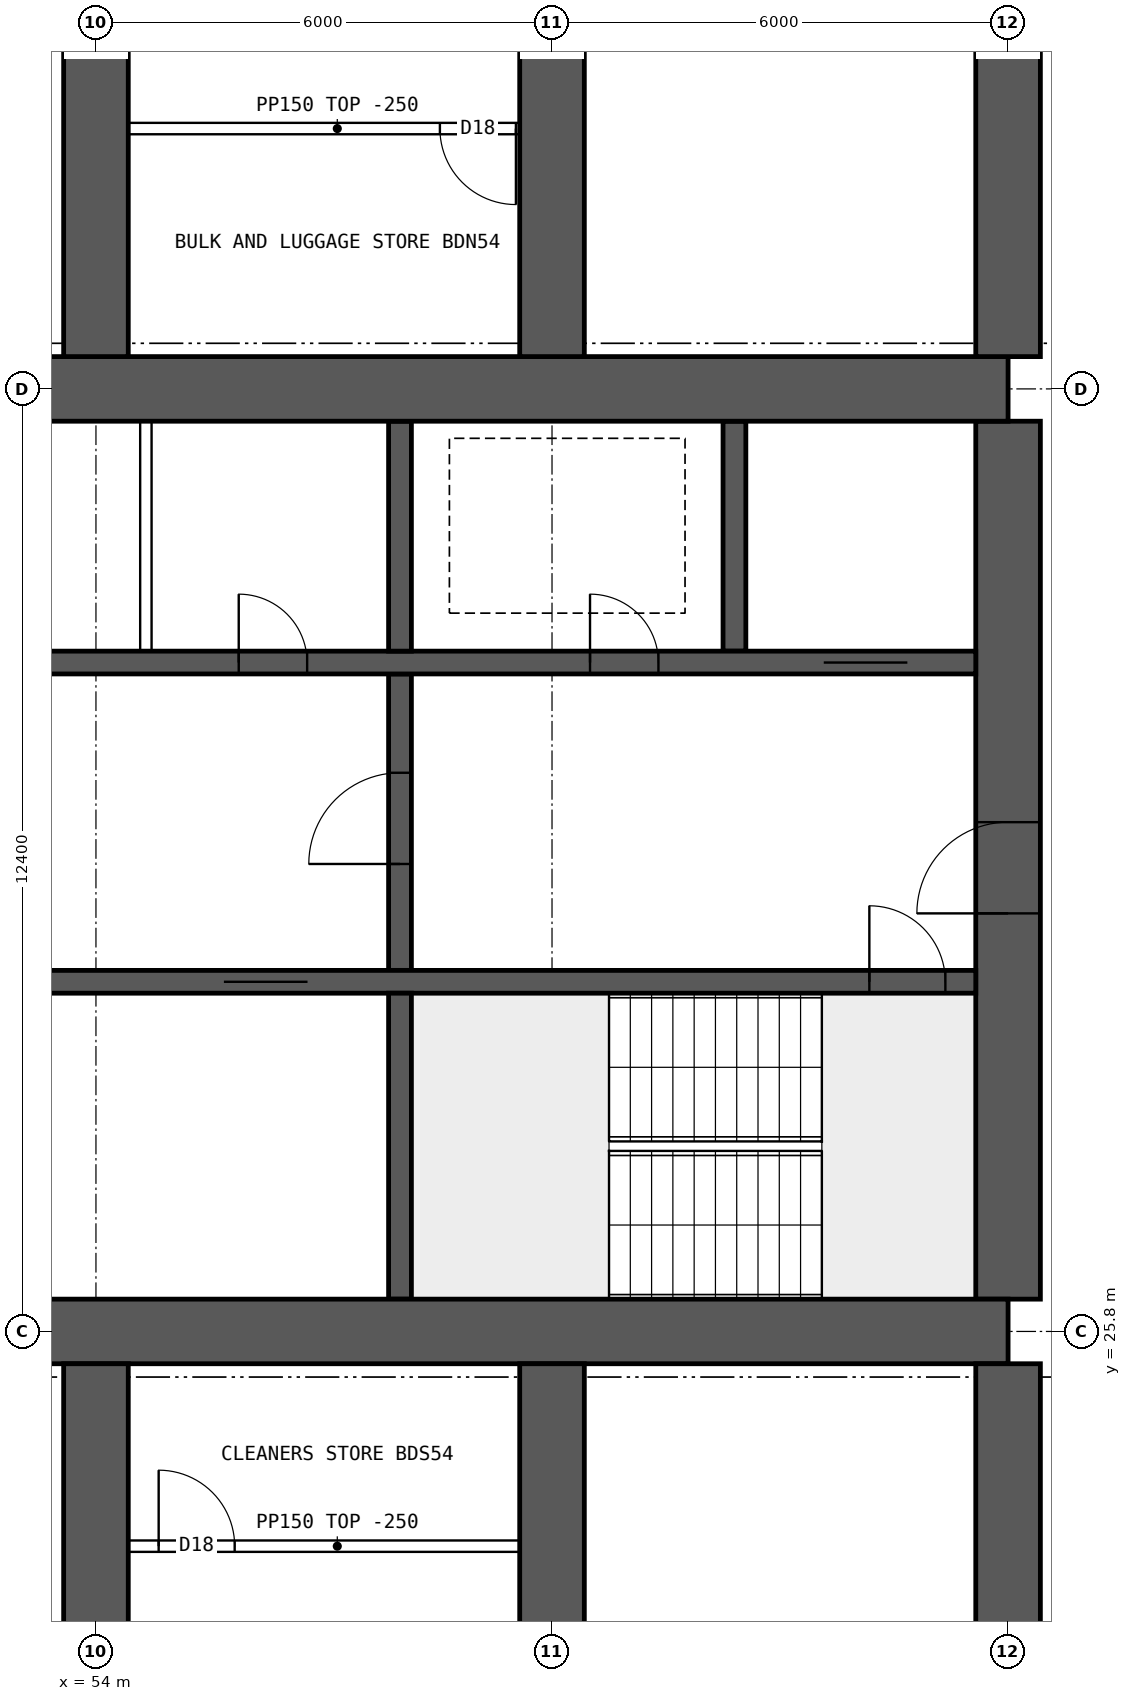
"""IFC4 building model, lengths in metres.
Left out: names, types, materials, properties, quantities, classifications, styles, units other than length and angle.
Written with IfcOpenShell. Run it as: python <this file> out.ifc"""

import sys

from ifc_helpers import new_model, si_unit, direction, frame, frame_2d, origin, place, context, subcontext, project, spatial, rectangle, extrude, element, fill, save


model = new_model("IFC4")
c1 = context("Model", 3, precision=1e-05, world=origin(), true_north=direction((0.0, 1.0)))
c2 = subcontext(c1, "Body", "Model", "MODEL_VIEW")
j1 = project(units=[si_unit("LENGTHUNIT", "METRE"), si_unit("PLANEANGLEUNIT", "RADIAN")], contexts=[c1])
p1 = place(None, origin())
s1 = spatial("IfcSite", under=j1, at=p1, CompositionType="ELEMENT")
p2 = place(p1, origin())
s2 = spatial("IfcBuilding", under=s1, at=p2, CompositionType="ELEMENT")
p3 = place(p2, frame((0.0, 0.0, 152.35)))
s3 = spatial("IfcBuildingStorey", under=s2, at=p3, CompositionType="ELEMENT", Elevation=152.35)
for number, where, z_axis, x_axis in (
    (1, (18.0, 25.8, 0.0), (0.0, 0.0, 1.0), (1.0, 0.0, 0.0)),
    (2, (18.0, 38.2, 0.0), (0.0, 0.0, 1.0), (1.0, 0.0, 0.0)),
):
    element("IfcWall", number, at=place(p3, frame(where, z_axis=z_axis, x_axis=x_axis)), inside=s3, PredefinedType="SHEAR", context=c2, shape_type="SweptSolid", body=[
        extrude(rectangle(XDim=48.0, YDim=0.85, at=frame_2d((24.0, 0.0))), origin(), (0.0, 0.0, 1.0), 3.75),
    ])
p4 = place(p3, frame((66.0, 26.225, 0.0), z_axis=(0.0, 0.0, 1.0), x_axis=(0.0, 1.0, 0.0)))
e3 = element("IfcWall", 3, at=p4, inside=s3, PredefinedType="SHEAR", context=c2, shape_type="SweptSolid", body=[
    extrude(rectangle(XDim=11.55, YDim=0.85, at=frame_2d((5.775, 0.0))), origin(), (0.0, 0.0, 1.0), 3.75),
])
p5 = place(p4, frame((5.075, 0.0, 0.0)))
e4 = element("IfcOpeningElement", 4, at=p5, cuts=e3, PredefinedType="OPENING", context=c2, shape_type="SweptSolid", body=[
    extrude(rectangle(XDim=1.2, YDim=2.1, at=frame_2d((0.6, 1.05))), frame((0.0, 0.435, 0.0), z_axis=(0.0, -1.0, 0.0), x_axis=(1.0, 0.0, 0.0)), (0.0, 0.0, 1.0), 0.87),
])
p6 = place(p3, frame((18.425, 30.4, 0.0), z_axis=(0.0, 0.0, 1.0), x_axis=(1.0, 0.0, 0.0)))
e5 = element("IfcWall", 5, at=p6, inside=s3, PredefinedType="SHEAR", context=c2, shape_type="SweptSolid", body=[
    extrude(rectangle(XDim=47.15, YDim=0.3, at=frame_2d((23.575, 0.0))), origin(), (0.0, 0.0, 1.0), 3.75),
])
p7 = place(p6, frame((0.4, 0.0, 0.0)))
e6 = element("IfcOpeningElement", 6, at=p7, cuts=e5, PredefinedType="OPENING", context=c2, shape_type="SweptSolid", body=[
    extrude(rectangle(XDim=1.0, YDim=2.1, at=frame_2d((0.5, 1.05))), frame((0.0, 0.16, 0.0), z_axis=(0.0, -1.0, 0.0), x_axis=(1.0, 0.0, 0.0)), (0.0, 0.0, 1.0), 0.32),
])
p8 = place(p6, frame((45.75, 0.0, 0.0)))
e7 = element("IfcOpeningElement", 7, at=p8, cuts=e5, PredefinedType="OPENING", context=c2, shape_type="SweptSolid", body=[
    extrude(rectangle(XDim=1.0, YDim=2.1, at=frame_2d((0.5, 1.05))), frame((0.0, 0.16, 0.0), z_axis=(0.0, -1.0, 0.0), x_axis=(1.0, 0.0, 0.0)), (0.0, 0.0, 1.0), 0.32),
])
p9 = place(p6, frame((8.325, 0.0, 0.0)))
e8 = element("IfcOpeningElement", 8, at=p9, cuts=e5, PredefinedType="OPENING", context=c2, shape_type="SweptSolid", body=[
    extrude(rectangle(XDim=1.1, YDim=2.1, at=frame_2d((0.55, 1.05))), frame((0.0, 0.16, 0.0), z_axis=(0.0, -1.0, 0.0), x_axis=(1.0, 0.0, 0.0)), (0.0, 0.0, 1.0), 0.32),
])
p10 = place(p6, frame((10.925, 0.0, 0.0)))
e9 = element("IfcOpeningElement", 9, at=p10, cuts=e5, PredefinedType="OPENING", context=c2, shape_type="SweptSolid", body=[
    extrude(rectangle(XDim=1.1, YDim=2.1, at=frame_2d((0.55, 1.05))), frame((0.0, 0.16, 0.0), z_axis=(0.0, -1.0, 0.0), x_axis=(1.0, 0.0, 0.0)), (0.0, 0.0, 1.0), 0.32),
])
p11 = place(p6, frame((13.525, 0.0, 0.0)))
e10 = element("IfcOpeningElement", 10, at=p11, cuts=e5, PredefinedType="OPENING", context=c2, shape_type="SweptSolid", body=[
    extrude(rectangle(XDim=1.1, YDim=2.1, at=frame_2d((0.55, 1.05))), frame((0.0, 0.16, 0.0), z_axis=(0.0, -1.0, 0.0), x_axis=(1.0, 0.0, 0.0)), (0.0, 0.0, 1.0), 0.32),
])
p12 = place(p6, frame((16.125, 0.0, 0.0)))
e11 = element("IfcOpeningElement", 11, at=p12, cuts=e5, PredefinedType="OPENING", context=c2, shape_type="SweptSolid", body=[
    extrude(rectangle(XDim=1.1, YDim=2.1, at=frame_2d((0.55, 1.05))), frame((0.0, 0.16, 0.0), z_axis=(0.0, -1.0, 0.0), x_axis=(1.0, 0.0, 0.0)), (0.0, 0.0, 1.0), 0.32),
])
p13 = place(p6, frame((18.9, 0.0, 0.0)))
e12 = element("IfcOpeningElement", 12, at=p13, cuts=e5, PredefinedType="OPENING", context=c2, shape_type="SweptSolid", body=[
    extrude(rectangle(XDim=0.9, YDim=2.1, at=frame_2d((0.45, 1.05))), frame((0.0, 0.16, 0.0), z_axis=(0.0, -1.0, 0.0), x_axis=(1.0, 0.0, 0.0)), (0.0, 0.0, 1.0), 0.32),
])
p14 = place(p6, frame((30.192, 0.0, 0.0)))
e13 = element("IfcOpeningElement", 13, at=p14, cuts=e5, PredefinedType="OPENING", context=c2, shape_type="SweptSolid", body=[
    extrude(rectangle(XDim=1.1, YDim=2.1, at=frame_2d((0.55, 1.05))), frame((0.0, 0.16, 0.0), z_axis=(0.0, -1.0, 0.0), x_axis=(1.0, 0.0, 0.0)), (0.0, 0.0, 1.0), 0.32),
])
p15 = place(p6, frame((33.725, 0.0, 0.0)))
e14 = element("IfcOpeningElement", 14, at=p15, cuts=e5, PredefinedType="OPENING", context=c2, shape_type="SweptSolid", body=[
    extrude(rectangle(XDim=1.1, YDim=2.1, at=frame_2d((0.55, 1.05))), frame((0.0, 0.16, 0.0), z_axis=(0.0, -1.0, 0.0), x_axis=(1.0, 0.0, 0.0)), (0.0, 0.0, 1.0), 0.32),
])
p16 = place(p6, frame((37.258, 0.0, 0.0)))
e15 = element("IfcOpeningElement", 15, at=p16, cuts=e5, PredefinedType="OPENING", context=c2, shape_type="SweptSolid", body=[
    extrude(rectangle(XDim=1.1, YDim=2.1, at=frame_2d((0.55, 1.05))), frame((0.0, 0.16, 0.0), z_axis=(0.0, -1.0, 0.0), x_axis=(1.0, 0.0, 0.0)), (0.0, 0.0, 1.0), 0.32),
])
p17 = place(p3, frame((18.425, 34.6, 0.0), z_axis=(0.0, 0.0, 1.0), x_axis=(1.0, 0.0, 0.0)))
e16 = element("IfcWall", 16, at=p17, inside=s3, PredefinedType="SHEAR", context=c2, shape_type="SweptSolid", body=[
    extrude(rectangle(XDim=47.15, YDim=0.3, at=frame_2d((23.575, 0.0))), origin(), (0.0, 0.0, 1.0), 3.75),
])
p18 = place(p17, frame((0.9, 0.0, 0.0)))
e17 = element("IfcOpeningElement", 17, at=p18, cuts=e16, PredefinedType="OPENING", context=c2, shape_type="SweptSolid", body=[
    extrude(rectangle(XDim=1.1, YDim=2.1, at=frame_2d((0.55, 1.05))), frame((0.0, 0.16, 0.0), z_axis=(0.0, -1.0, 0.0), x_axis=(1.0, 0.0, 0.0)), (0.0, 0.0, 1.0), 0.32),
])
p19 = place(p17, frame((45.15, 0.0, 0.0)))
e18 = element("IfcOpeningElement", 18, at=p19, cuts=e16, PredefinedType="OPENING", context=c2, shape_type="SweptSolid", body=[
    extrude(rectangle(XDim=1.1, YDim=2.1, at=frame_2d((0.55, 1.05))), frame((0.0, 0.16, 0.0), z_axis=(0.0, -1.0, 0.0), x_axis=(1.0, 0.0, 0.0)), (0.0, 0.0, 1.0), 0.32),
])
p20 = place(p17, frame((4.175, 0.0, 0.0)))
e19 = element("IfcOpeningElement", 19, at=p20, cuts=e16, PredefinedType="OPENING", context=c2, shape_type="SweptSolid", body=[
    extrude(rectangle(XDim=0.9, YDim=2.1, at=frame_2d((0.45, 1.05))), frame((0.0, 0.16, 0.0), z_axis=(0.0, -1.0, 0.0), x_axis=(1.0, 0.0, 0.0)), (0.0, 0.0, 1.0), 0.32),
])
p21 = place(p17, frame((42.075, 0.0, 0.0)))
e20 = element("IfcOpeningElement", 20, at=p21, cuts=e16, PredefinedType="OPENING", context=c2, shape_type="SweptSolid", body=[
    extrude(rectangle(XDim=0.9, YDim=2.1, at=frame_2d((0.45, 1.05))), frame((0.0, 0.16, 0.0), z_axis=(0.0, -1.0, 0.0), x_axis=(1.0, 0.0, 0.0)), (0.0, 0.0, 1.0), 0.32),
])
p22 = place(p17, frame((8.95, 0.0, 0.0)))
e21 = element("IfcOpeningElement", 21, at=p22, cuts=e16, PredefinedType="OPENING", context=c2, shape_type="SweptSolid", body=[
    extrude(rectangle(XDim=0.9, YDim=2.1, at=frame_2d((0.45, 1.05))), frame((0.0, 0.16, 0.0), z_axis=(0.0, -1.0, 0.0), x_axis=(1.0, 0.0, 0.0)), (0.0, 0.0, 1.0), 0.32),
])
p23 = place(p17, frame((12.924, 0.0, 0.0)))
e22 = element("IfcOpeningElement", 22, at=p23, cuts=e16, PredefinedType="OPENING", context=c2, shape_type="SweptSolid", body=[
    extrude(rectangle(XDim=0.9, YDim=2.1, at=frame_2d((0.45, 1.05))), frame((0.0, 0.16, 0.0), z_axis=(0.0, -1.0, 0.0), x_axis=(1.0, 0.0, 0.0)), (0.0, 0.0, 1.0), 0.32),
])
p24 = place(p17, frame((16.571, 0.0, 0.0)))
e23 = element("IfcOpeningElement", 23, at=p24, cuts=e16, PredefinedType="OPENING", context=c2, shape_type="SweptSolid", body=[
    extrude(rectangle(XDim=0.9, YDim=2.1, at=frame_2d((0.45, 1.05))), frame((0.0, 0.16, 0.0), z_axis=(0.0, -1.0, 0.0), x_axis=(1.0, 0.0, 0.0)), (0.0, 0.0, 1.0), 0.32),
])
p25 = place(p17, frame((20.33, 0.0, 0.0)))
e24 = element("IfcOpeningElement", 24, at=p25, cuts=e16, PredefinedType="OPENING", context=c2, shape_type="SweptSolid", body=[
    extrude(rectangle(XDim=0.9, YDim=2.1, at=frame_2d((0.45, 1.05))), frame((0.0, 0.16, 0.0), z_axis=(0.0, -1.0, 0.0), x_axis=(1.0, 0.0, 0.0)), (0.0, 0.0, 1.0), 0.32),
])
p26 = place(p17, frame((24.736, 0.0, 0.0)))
e25 = element("IfcOpeningElement", 25, at=p26, cuts=e16, PredefinedType="OPENING", context=c2, shape_type="SweptSolid", body=[
    extrude(rectangle(XDim=0.9, YDim=2.1, at=frame_2d((0.45, 1.05))), frame((0.0, 0.16, 0.0), z_axis=(0.0, -1.0, 0.0), x_axis=(1.0, 0.0, 0.0)), (0.0, 0.0, 1.0), 0.32),
])
p27 = place(p17, frame((27.533, 0.0, 0.0)))
e26 = element("IfcOpeningElement", 26, at=p27, cuts=e16, PredefinedType="OPENING", context=c2, shape_type="SweptSolid", body=[
    extrude(rectangle(XDim=0.9, YDim=2.1, at=frame_2d((0.45, 1.05))), frame((0.0, 0.16, 0.0), z_axis=(0.0, -1.0, 0.0), x_axis=(1.0, 0.0, 0.0)), (0.0, 0.0, 1.0), 0.32),
])
p28 = place(p17, frame((29.703, 0.0, 0.0)))
e27 = element("IfcOpeningElement", 27, at=p28, cuts=e16, PredefinedType="OPENING", context=c2, shape_type="SweptSolid", body=[
    extrude(rectangle(XDim=0.9, YDim=2.1, at=frame_2d((0.45, 1.05))), frame((0.0, 0.16, 0.0), z_axis=(0.0, -1.0, 0.0), x_axis=(1.0, 0.0, 0.0)), (0.0, 0.0, 1.0), 0.32),
])
p29 = place(p17, frame((33.502, 0.0, 0.0)))
e28 = element("IfcOpeningElement", 28, at=p29, cuts=e16, PredefinedType="OPENING", context=c2, shape_type="SweptSolid", body=[
    extrude(rectangle(XDim=0.9, YDim=2.1, at=frame_2d((0.45, 1.05))), frame((0.0, 0.16, 0.0), z_axis=(0.0, -1.0, 0.0), x_axis=(1.0, 0.0, 0.0)), (0.0, 0.0, 1.0), 0.32),
])
p30 = place(p17, frame((37.453, 0.0, 0.0)))
e29 = element("IfcOpeningElement", 29, at=p30, cuts=e16, PredefinedType="OPENING", context=c2, shape_type="SweptSolid", body=[
    extrude(rectangle(XDim=0.9, YDim=2.1, at=frame_2d((0.45, 1.05))), frame((0.0, 0.16, 0.0), z_axis=(0.0, -1.0, 0.0), x_axis=(1.0, 0.0, 0.0)), (0.0, 0.0, 1.0), 0.32),
])
p31 = place(p3, frame((58.0, 26.225, 0.0), z_axis=(0.0, 0.0, 1.0), x_axis=(0.0, 1.0, 0.0)))
e30 = element("IfcWall", 30, at=p31, inside=s3, PredefinedType="SHEAR", context=c2, shape_type="SweptSolid", body=[
    extrude(rectangle(XDim=4.025, YDim=0.3, at=frame_2d((2.012, 0.0))), origin(), (0.0, 0.0, 1.0), 3.75),
])
p32 = place(p3, frame((58.0, 30.55, 0.0), z_axis=(0.0, 0.0, 1.0), x_axis=(0.0, 1.0, 0.0)))
e31 = element("IfcWall", 31, at=p32, inside=s3, PredefinedType="SHEAR", context=c2, shape_type="SweptSolid", body=[
    extrude(rectangle(XDim=3.9, YDim=0.3, at=frame_2d((1.95, 0.0))), origin(), (0.0, 0.0, 1.0), 3.75),
])
p33 = place(p32, frame((1.4, 0.0, 0.0)))
e32 = element("IfcOpeningElement", 32, at=p33, cuts=e31, PredefinedType="OPENING", context=c2, shape_type="SweptSolid", body=[
    extrude(rectangle(XDim=1.2, YDim=2.1, at=frame_2d((0.6, 1.05))), frame((0.0, 0.16, 0.0), z_axis=(0.0, -1.0, 0.0), x_axis=(1.0, 0.0, 0.0)), (0.0, 0.0, 1.0), 0.32),
])
for number, where, z_axis, x_axis in (
    (33, (62.4, 34.75, 0.0), (0.0, 0.0, 1.0), (0.0, 1.0, 0.0)),
    (34, (58.0, 34.75, 0.0), (0.0, 0.0, 1.0), (0.0, 1.0, 0.0)),
):
    element("IfcWall", number, at=place(p3, frame(where, z_axis=z_axis, x_axis=x_axis)), inside=s3, PredefinedType="SHEAR", context=c2, shape_type="SweptSolid", body=[
        extrude(rectangle(XDim=3.025, YDim=0.3, at=frame_2d((1.512, 0.0))), origin(), (0.0, 0.0, 1.0), 3.75),
    ])
for number, where, z_axis, x_axis in (
    (35, (54.0, 17.2, 0.0), (0.0, 0.0, 1.0), (0.0, 1.0, 0.0)),
    (36, (54.0, 38.625, 0.0), (0.0, 0.0, 1.0), (0.0, 1.0, 0.0)),
    (37, (60.0, 17.2, 0.0), (0.0, 0.0, 1.0), (0.0, 1.0, 0.0)),
    (38, (60.0, 38.625, 0.0), (0.0, 0.0, 1.0), (0.0, 1.0, 0.0)),
    (39, (66.0, 17.2, 0.0), (0.0, 0.0, 1.0), (0.0, 1.0, 0.0)),
    (40, (66.0, 38.625, 0.0), (0.0, 0.0, 1.0), (0.0, 1.0, 0.0)),
):
    element("IfcWall", number, at=place(p3, frame(where, z_axis=z_axis, x_axis=x_axis)), inside=s3, PredefinedType="SHEAR", context=c2, shape_type="SweptSolid", body=[
        extrude(rectangle(XDim=8.175, YDim=0.85, at=frame_2d((4.087, 0.0))), origin(), (0.0, 0.0, 1.0), 3.75),
    ])
p34 = place(p3, frame((54.657, 34.75, 0.0), z_axis=(0.0, 0.0, 1.0), x_axis=(0.0, 1.0, 0.0)))
e41 = element("IfcWall", 41, at=p34, inside=s3, PredefinedType="SOLIDWALL", context=c2, shape_type="SweptSolid", body=[
    extrude(rectangle(XDim=3.025, YDim=0.15, at=frame_2d((1.512, 0.0))), origin(), (0.0, 0.0, 1.0), 3.5),
])
p35 = place(p3, frame((54.425, 22.975, 0.0), z_axis=(0.0, 0.0, 1.0), x_axis=(1.0, 0.0, 0.0)))
e42 = element("IfcWall", 42, at=p35, inside=s3, PredefinedType="PARTITIONING", context=c2, shape_type="SweptSolid", body=[
    extrude(rectangle(XDim=5.5, YDim=0.15, at=frame_2d((2.75, 0.0))), origin(), (0.0, 0.0, 1.0), 3.5),
])
p36 = place(p35, frame((0.4, 0.0, 0.0)))
e43 = element("IfcOpeningElement", 43, at=p36, cuts=e42, PredefinedType="OPENING", context=c2, shape_type="SweptSolid", body=[
    extrude(rectangle(XDim=1.0, YDim=2.1, at=frame_2d((0.5, 1.05))), frame((0.0, 0.085, 0.0), z_axis=(0.0, -1.0, 0.0), x_axis=(1.0, 0.0, 0.0)), (0.0, 0.0, 1.0), 0.17),
])
p37 = place(p3, frame((59.925, 41.625, 0.0), z_axis=(0.0, 0.0, 1.0), x_axis=(-1.0, 0.0, 0.0)))
e44 = element("IfcWall", 44, at=p37, inside=s3, PredefinedType="PARTITIONING", context=c2, shape_type="SweptSolid", body=[
    extrude(rectangle(XDim=5.5, YDim=0.15, at=frame_2d((2.75, 0.0))), origin(), (0.0, 0.0, 1.0), 3.5),
])
p38 = place(p37, frame((0.4, 0.0, 0.0)))
e45 = element("IfcOpeningElement", 45, at=p38, cuts=e44, PredefinedType="OPENING", context=c2, shape_type="SweptSolid", body=[
    extrude(rectangle(XDim=1.0, YDim=2.1, at=frame_2d((0.5, 1.05))), frame((0.0, 0.085, 0.0), z_axis=(0.0, -1.0, 0.0), x_axis=(1.0, 0.0, 0.0)), (0.0, 0.0, 1.0), 0.17),
])
p39 = place(p5, origin())
e46 = element("IfcDoor", 46, at=p39, inside=s3, OperationType="SINGLE_SWING_LEFT", PredefinedType="DOOR", context=c2, shape_type="SweptSolid", body=[
    extrude(rectangle(XDim=1.2, YDim=2.1, at=frame_2d((0.6, 1.05))), frame((0.0, 0.025, 0.0), z_axis=(0.0, -1.0, 0.0), x_axis=(1.0, 0.0, 0.0)), (0.0, 0.0, 1.0), 0.05),
])
fill(e4, e46)
p40 = place(p8, origin())
e47 = element("IfcDoor", 47, at=p40, inside=s3, OperationType="SINGLE_SWING_LEFT", PredefinedType="DOOR", context=c2, shape_type="SweptSolid", body=[
    extrude(rectangle(XDim=1.0, YDim=2.1, at=frame_2d((0.5, 1.05))), frame((0.0, 0.025, 0.0), z_axis=(0.0, -1.0, 0.0), x_axis=(1.0, 0.0, 0.0)), (0.0, 0.0, 1.0), 0.05),
])
fill(e7, e47)
p41 = place(p19, origin())
e48 = element("IfcDoor", 48, at=p41, inside=s3, OperationType="DOUBLE_DOOR_SLIDING", PredefinedType="DOOR", context=c2, shape_type="SweptSolid", body=[
    extrude(rectangle(XDim=1.1, YDim=2.1, at=frame_2d((0.55, 1.05))), frame((0.0, 0.025, 0.0), z_axis=(0.0, -1.0, 0.0), x_axis=(1.0, 0.0, 0.0)), (0.0, 0.0, 1.0), 0.05),
])
fill(e18, e48)
p42 = place(p21, origin())
e49 = element("IfcDoor", 49, at=p42, inside=s3, OperationType="SINGLE_SWING_LEFT", PredefinedType="DOOR", context=c2, shape_type="SweptSolid", body=[
    extrude(rectangle(XDim=0.9, YDim=2.1, at=frame_2d((0.45, 1.05))), frame((0.0, 0.025, 0.0), z_axis=(0.0, -1.0, 0.0), x_axis=(1.0, 0.0, 0.0)), (0.0, 0.0, 1.0), 0.05),
])
fill(e20, e49)
p43 = place(p33, origin())
e50 = element("IfcDoor", 50, at=p43, inside=s3, OperationType="SINGLE_SWING_LEFT", PredefinedType="DOOR", context=c2, shape_type="SweptSolid", body=[
    extrude(rectangle(XDim=1.2, YDim=2.1, at=frame_2d((0.6, 1.05))), frame((0.0, 0.025, 0.0), z_axis=(0.0, -1.0, 0.0), x_axis=(1.0, 0.0, 0.0)), (0.0, 0.0, 1.0), 0.05),
])
fill(e32, e50)
p44 = place(p30, origin())
e51 = element("IfcDoor", 51, at=p44, inside=s3, OperationType="SINGLE_SWING_LEFT", PredefinedType="DOOR", context=c2, shape_type="SweptSolid", body=[
    extrude(rectangle(XDim=0.9, YDim=2.1, at=frame_2d((0.45, 1.05))), frame((0.0, 0.025, 0.0), z_axis=(0.0, -1.0, 0.0), x_axis=(1.0, 0.0, 0.0)), (0.0, 0.0, 1.0), 0.05),
])
fill(e29, e51)
p45 = place(p16, origin())
e52 = element("IfcDoor", 52, at=p45, inside=s3, OperationType="DOUBLE_DOOR_SLIDING", PredefinedType="DOOR", context=c2, shape_type="SweptSolid", body=[
    extrude(rectangle(XDim=1.1, YDim=2.1, at=frame_2d((0.55, 1.05))), frame((0.0, 0.025, 0.0), z_axis=(0.0, -1.0, 0.0), x_axis=(1.0, 0.0, 0.0)), (0.0, 0.0, 1.0), 0.05),
])
fill(e15, e52)
p46 = place(p36, origin())
e53 = element("IfcDoor", 53, at=p46, inside=s3, OperationType="SINGLE_SWING_LEFT", PredefinedType="DOOR", context=c2, shape_type="SweptSolid", body=[
    extrude(rectangle(XDim=1.0, YDim=2.1, at=frame_2d((0.5, 1.05))), frame((0.0, 0.025, 0.0), z_axis=(0.0, -1.0, 0.0), x_axis=(1.0, 0.0, 0.0)), (0.0, 0.0, 1.0), 0.05),
])
fill(e43, e53)
p47 = place(p38, origin())
e54 = element("IfcDoor", 54, at=p47, inside=s3, OperationType="SINGLE_SWING_LEFT", PredefinedType="DOOR", context=c2, shape_type="SweptSolid", body=[
    extrude(rectangle(XDim=1.0, YDim=2.1, at=frame_2d((0.5, 1.05))), frame((0.0, 0.025, 0.0), z_axis=(0.0, -1.0, 0.0), x_axis=(1.0, 0.0, 0.0)), (0.0, 0.0, 1.0), 0.05),
])
fill(e45, e54)
save(model, sys.argv[1])
